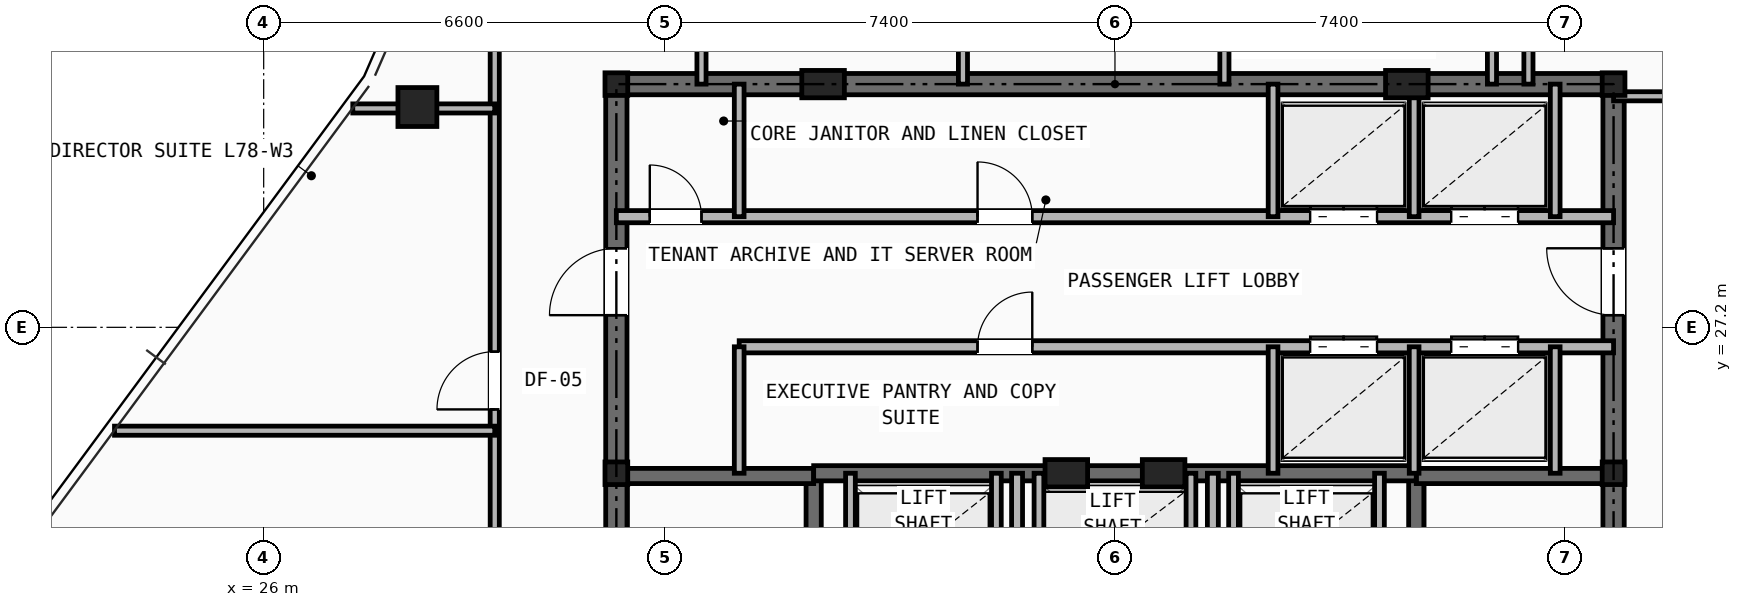
"""IFC4 building model, lengths in metres.
Left out: names, types, materials, properties, quantities, classifications, styles, units other than length and angle.
Written with IfcOpenShell. Run it as: python <this file> out.ifc"""

import sys

from ifc_helpers import new_model, si_unit, direction, frame, frame_2d, origin, origin_2d, place, context, subcontext, project, spatial, rectangle, hollow_rectangle, i_section, extrude, element, fill, save


model = new_model("IFC4")
c1 = context("Model", 3, precision=1e-05, world=origin(), true_north=direction((0.0, 1.0)))
c2 = subcontext(c1, "Body", "Model", "MODEL_VIEW")
j1 = project(units=[si_unit("LENGTHUNIT", "METRE"), si_unit("PLANEANGLEUNIT", "RADIAN")], contexts=[c1])
p1 = place(None, origin())
s1 = spatial("IfcSite", under=j1, at=p1, CompositionType="ELEMENT")
p2 = place(p1, origin())
s2 = spatial("IfcBuilding", under=s1, at=p2, CompositionType="ELEMENT")
p3 = place(p2, frame((0.0, 0.0, 276.0)))
s3 = spatial("IfcBuildingStorey", under=s2, at=p3, CompositionType="ELEMENT", Elevation=276.0)
for number, where, z_axis, x_axis in (
    (1, (31.8, 24.8, 0.0), (0.0, 0.0, 1.0), (1.0, 0.0, 0.0)),
    (2, (48.2, 24.8, 0.0), (0.0, 0.0, 1.0), (1.0, 0.0, 0.0)),
    (3, (31.8, 31.2, 0.0), (0.0, 0.0, 1.0), (1.0, 0.0, 0.0)),
    (4, (48.2, 31.2, 0.0), (0.0, 0.0, 1.0), (1.0, 0.0, 0.0)),
):
    element("IfcColumn", number, at=place(p3, frame(where, z_axis=z_axis, x_axis=x_axis)), inside=s3, PredefinedType="COLUMN", context=c2, shape_type="SweptSolid", body=[
        extrude(i_section(OverallWidth=0.374, OverallDepth=0.372, WebThickness=0.016, FlangeThickness=0.026, at=origin_2d()), origin(), (0.0, 0.0, 1.0), 3.5),
    ])
for number, where, z_axis, x_axis in (
    (5, (35.2, 31.2, 0.0), (0.0, 0.0, 1.0), (1.0, 0.0, 0.0)),
    (6, (44.8, 31.2, 0.0), (0.0, 0.0, 1.0), (1.0, 0.0, 0.0)),
    (7, (39.2, 24.8, 0.0), (0.0, 0.0, 1.0), (1.0, 0.0, 0.0)),
    (8, (40.8, 24.8, 0.0), (0.0, 0.0, 1.0), (1.0, 0.0, 0.0)),
):
    element("IfcColumn", number, at=place(p3, frame(where, z_axis=z_axis, x_axis=x_axis)), inside=s3, PredefinedType="PILASTER", context=c2, shape_type="SweptSolid", body=[
        extrude(rectangle(XDim=0.7, YDim=0.45, at=origin_2d()), origin(), (0.0, 0.0, 1.0), 3.5),
    ])
p4 = place(p3, frame((28.528, 30.823, 0.0), z_axis=(0.0, 0.0, 1.0), x_axis=(1.0, 0.0, 0.0)))
e9 = element("IfcColumn", 9, at=p4, inside=s3, PredefinedType="COLUMN", context=c2, shape_type="SweptSolid", body=[
    extrude(hollow_rectangle(XDim=0.64, YDim=0.64, WallThickness=0.045, at=origin_2d()), origin(), (0.0, 0.0, 1.0), 3.5),
])
p5 = place(p3, frame((31.8, 31.2, 0.0), z_axis=(0.0, 0.0, 1.0), x_axis=(1.0, 0.0, 0.0)))
e10 = element("IfcWall", 10, at=p5, inside=s3, PredefinedType="SHEAR", context=c2, shape_type="SweptSolid", body=[
    extrude(rectangle(XDim=16.4, YDim=0.35, at=frame_2d((8.2, 0.0))), origin(), (0.0, 0.0, 1.0), 3.25),
])
p6 = place(p3, frame((31.8, 16.4, 0.0), z_axis=(0.0, 0.0, 1.0), x_axis=(0.0, 1.0, 0.0)))
e11 = element("IfcWall", 11, at=p6, inside=s3, PredefinedType="SHEAR", context=c2, shape_type="SweptSolid", body=[
    extrude(rectangle(XDim=14.8, YDim=0.35, at=frame_2d((7.4, 0.0))), origin(), (0.0, 0.0, 1.0), 3.25),
])
p7 = place(p6, frame((11.0, 0.0, 0.0)))
e12 = element("IfcOpeningElement", 12, at=p7, cuts=e11, PredefinedType="OPENING", context=c2, shape_type="SweptSolid", body=[
    extrude(rectangle(XDim=1.1, YDim=2.15, at=frame_2d((0.55, 1.075))), frame((0.0, 0.185, 0.0), z_axis=(0.0, -1.0, 0.0), x_axis=(1.0, 0.0, 0.0)), (0.0, 0.0, 1.0), 0.37),
])
p8 = place(p3, frame((48.2, 16.4, 0.0), z_axis=(0.0, 0.0, 1.0), x_axis=(0.0, 1.0, 0.0)))
e13 = element("IfcWall", 13, at=p8, inside=s3, PredefinedType="SHEAR", context=c2, shape_type="SweptSolid", body=[
    extrude(rectangle(XDim=14.8, YDim=0.35, at=frame_2d((7.4, 0.0))), origin(), (0.0, 0.0, 1.0), 3.25),
])
p9 = place(p8, frame((11.0, 0.0, 0.0)))
e14 = element("IfcOpeningElement", 14, at=p9, cuts=e13, PredefinedType="OPENING", context=c2, shape_type="SweptSolid", body=[
    extrude(rectangle(XDim=1.1, YDim=2.15, at=frame_2d((0.55, 1.075))), frame((0.0, 0.185, 0.0), z_axis=(0.0, -1.0, 0.0), x_axis=(1.0, 0.0, 0.0)), (0.0, 0.0, 1.0), 0.37),
])
p10 = place(p3, frame((35.045, 16.4, 0.0), z_axis=(0.0, 0.0, 1.0), x_axis=(0.0, 1.0, 0.0)))
e15 = element("IfcWall", 15, at=p10, inside=s3, PredefinedType="SHEAR", context=c2, shape_type="SweptSolid", body=[
    extrude(rectangle(XDim=8.4, YDim=0.25, at=frame_2d((4.2, 0.0))), origin(), (0.0, 0.0, 1.0), 3.25),
])
p11 = place(p10, frame((0.45, 0.0, 0.0)))
e16 = element("IfcOpeningElement", 16, at=p11, cuts=e15, PredefinedType="OPENING", context=c2, shape_type="SweptSolid", body=[
    extrude(rectangle(XDim=0.95, YDim=2.1, at=frame_2d((0.475, 1.05))), frame((0.0, 0.135, 0.0), z_axis=(0.0, -1.0, 0.0), x_axis=(1.0, 0.0, 0.0)), (0.0, 0.0, 1.0), 0.27),
])
p12 = place(p3, frame((31.8, 24.755, 0.0), z_axis=(0.0, 0.0, 1.0), x_axis=(1.0, 0.0, 0.0)))
e17 = element("IfcWall", 17, at=p12, inside=s3, PredefinedType="SHEAR", context=c2, shape_type="SweptSolid", body=[
    extrude(rectangle(XDim=3.245, YDim=0.25, at=frame_2d((1.623, 0.0))), origin(), (0.0, 0.0, 1.0), 3.25),
])
p13 = place(p3, frame((44.955, 16.4, 0.0), z_axis=(0.0, 0.0, 1.0), x_axis=(0.0, 1.0, 0.0)))
e18 = element("IfcWall", 18, at=p13, inside=s3, PredefinedType="SHEAR", context=c2, shape_type="SweptSolid", body=[
    extrude(rectangle(XDim=8.4, YDim=0.25, at=frame_2d((4.2, 0.0))), origin(), (0.0, 0.0, 1.0), 3.25),
])
p14 = place(p13, frame((0.45, 0.0, 0.0)))
e19 = element("IfcOpeningElement", 19, at=p14, cuts=e18, PredefinedType="OPENING", context=c2, shape_type="SweptSolid", body=[
    extrude(rectangle(XDim=0.95, YDim=2.1, at=frame_2d((0.475, 1.05))), frame((0.0, 0.135, 0.0), z_axis=(0.0, -1.0, 0.0), x_axis=(1.0, 0.0, 0.0)), (0.0, 0.0, 1.0), 0.27),
])
p15 = place(p3, frame((44.955, 24.755, 0.0), z_axis=(0.0, 0.0, 1.0), x_axis=(1.0, 0.0, 0.0)))
e20 = element("IfcWall", 20, at=p15, inside=s3, PredefinedType="SHEAR", context=c2, shape_type="SweptSolid", body=[
    extrude(rectangle(XDim=3.245, YDim=0.25, at=frame_2d((1.623, 0.0))), origin(), (0.0, 0.0, 1.0), 3.25),
])
p16 = place(p3, frame((35.045, 24.8, 0.0), z_axis=(0.0, 0.0, 1.0), x_axis=(1.0, 0.0, 0.0)))
e21 = element("IfcWall", 21, at=p16, inside=s3, PredefinedType="SHEAR", context=c2, shape_type="SweptSolid", body=[
    extrude(rectangle(XDim=9.91, YDim=0.25, at=frame_2d((4.955, 0.0))), origin(), (0.0, 0.0, 1.0), 3.25),
])
p17 = place(p3, frame((38.39, 16.4, 0.0), z_axis=(0.0, 0.0, 1.0), x_axis=(0.0, 1.0, 0.0)))
e22 = element("IfcWall", 22, at=p17, inside=s3, PredefinedType="PARTITIONING", context=c2, shape_type="SweptSolid", body=[
    extrude(rectangle(XDim=8.4, YDim=0.18, at=frame_2d((4.2, 0.0))), origin(), (0.0, 0.0, 1.0), 2.705),
])
p18 = place(p17, frame((3.8, 0.0, 0.0)))
e23 = element("IfcOpeningElement", 23, at=p18, cuts=e22, PredefinedType="OPENING", context=c2, shape_type="SweptSolid", body=[
    extrude(rectangle(XDim=0.95, YDim=2.1, at=frame_2d((0.475, 1.05))), frame((0.0, 0.1, 0.0), z_axis=(0.0, -1.0, 0.0), x_axis=(1.0, 0.0, 0.0)), (0.0, 0.0, 1.0), 0.2),
])
p19 = place(p3, frame((41.61, 16.4, 0.0), z_axis=(0.0, 0.0, 1.0), x_axis=(0.0, 1.0, 0.0)))
e24 = element("IfcWall", 24, at=p19, inside=s3, PredefinedType="PARTITIONING", context=c2, shape_type="SweptSolid", body=[
    extrude(rectangle(XDim=8.4, YDim=0.18, at=frame_2d((4.2, 0.0))), origin(), (0.0, 0.0, 1.0), 2.705),
])
for number, where, z_axis, x_axis in (
    (25, (35.65, 22.48, 0.0), (0.0, 0.0, 1.0), (0.0, 1.0, 0.0)),
    (26, (38.05, 22.48, 0.0), (0.0, 0.0, 1.0), (0.0, 1.0, 0.0)),
    (27, (41.95, 22.48, 0.0), (0.0, 0.0, 1.0), (0.0, 1.0, 0.0)),
    (28, (44.35, 22.48, 0.0), (0.0, 0.0, 1.0), (0.0, 1.0, 0.0)),
    (29, (38.75, 22.48, 0.0), (0.0, 0.0, 1.0), (0.0, 1.0, 0.0)),
    (30, (41.25, 22.48, 0.0), (0.0, 0.0, 1.0), (0.0, 1.0, 0.0)),
):
    element("IfcWall", number, at=place(p3, frame(where, z_axis=z_axis, x_axis=x_axis)), inside=s3, PredefinedType="SOLIDWALL", context=c2, shape_type="SweptSolid", body=[
        extrude(rectangle(XDim=2.32, YDim=0.16, at=frame_2d((1.16, 0.0))), origin(), (0.0, 0.0, 1.0), 3.25),
    ])
p20 = place(p3, frame((31.8, 29.02, 0.0), z_axis=(0.0, 0.0, 1.0), x_axis=(1.0, 0.0, 0.0)))
e31 = element("IfcWall", 31, at=p20, inside=s3, PredefinedType="SOLIDWALL", context=c2, shape_type="SweptSolid", body=[
    extrude(rectangle(XDim=16.4, YDim=0.2, at=frame_2d((8.2, 0.0))), origin(), (0.0, 0.0, 1.0), 2.705),
])
p21 = place(p20, frame((0.55, 0.0, 0.0)))
e32 = element("IfcOpeningElement", 32, at=p21, cuts=e31, PredefinedType="OPENING", context=c2, shape_type="SweptSolid", body=[
    extrude(rectangle(XDim=0.85, YDim=2.05, at=frame_2d((0.425, 1.025))), frame((0.0, 0.11, 0.0), z_axis=(0.0, -1.0, 0.0), x_axis=(1.0, 0.0, 0.0)), (0.0, 0.0, 1.0), 0.22),
])
p22 = place(p20, frame((5.94, 0.0, 0.0)))
e33 = element("IfcOpeningElement", 33, at=p22, cuts=e31, PredefinedType="OPENING", context=c2, shape_type="SweptSolid", body=[
    extrude(rectangle(XDim=0.9, YDim=2.1, at=frame_2d((0.45, 1.05))), frame((0.0, 0.11, 0.0), z_axis=(0.0, -1.0, 0.0), x_axis=(1.0, 0.0, 0.0)), (0.0, 0.0, 1.0), 0.22),
])
p23 = place(p20, frame((11.41, 0.0, 0.0)))
e34 = element("IfcOpeningElement", 34, at=p23, cuts=e31, PredefinedType="OPENING", context=c2, shape_type="SweptSolid", body=[
    extrude(rectangle(XDim=1.1, YDim=2.15, at=frame_2d((0.55, 1.075))), frame((0.0, 0.11, 0.0), z_axis=(0.0, -1.0, 0.0), x_axis=(1.0, 0.0, 0.0)), (0.0, 0.0, 1.0), 0.22),
])
p24 = place(p20, frame((13.73, 0.0, 0.0)))
e35 = element("IfcOpeningElement", 35, at=p24, cuts=e31, PredefinedType="OPENING", context=c2, shape_type="SweptSolid", body=[
    extrude(rectangle(XDim=1.1, YDim=2.15, at=frame_2d((0.55, 1.075))), frame((0.0, 0.11, 0.0), z_axis=(0.0, -1.0, 0.0), x_axis=(1.0, 0.0, 0.0)), (0.0, 0.0, 1.0), 0.22),
])
p25 = place(p3, frame((33.82, 26.88, 0.0), z_axis=(0.0, 0.0, 1.0), x_axis=(1.0, 0.0, 0.0)))
e36 = element("IfcWall", 36, at=p25, inside=s3, PredefinedType="SOLIDWALL", context=c2, shape_type="SweptSolid", body=[
    extrude(rectangle(XDim=14.38, YDim=0.2, at=frame_2d((7.19, 0.0))), origin(), (0.0, 0.0, 1.0), 2.705),
])
p26 = place(p25, frame((3.92, 0.0, 0.0)))
e37 = element("IfcOpeningElement", 37, at=p26, cuts=e36, PredefinedType="OPENING", context=c2, shape_type="SweptSolid", body=[
    extrude(rectangle(XDim=0.9, YDim=2.1, at=frame_2d((0.45, 1.05))), frame((0.0, 0.11, 0.0), z_axis=(0.0, -1.0, 0.0), x_axis=(1.0, 0.0, 0.0)), (0.0, 0.0, 1.0), 0.22),
])
p27 = place(p25, frame((9.39, 0.0, 0.0)))
e38 = element("IfcOpeningElement", 38, at=p27, cuts=e36, PredefinedType="OPENING", context=c2, shape_type="SweptSolid", body=[
    extrude(rectangle(XDim=1.1, YDim=2.15, at=frame_2d((0.55, 1.075))), frame((0.0, 0.11, 0.0), z_axis=(0.0, -1.0, 0.0), x_axis=(1.0, 0.0, 0.0)), (0.0, 0.0, 1.0), 0.22),
])
p28 = place(p25, frame((11.71, 0.0, 0.0)))
e39 = element("IfcOpeningElement", 39, at=p28, cuts=e36, PredefinedType="OPENING", context=c2, shape_type="SweptSolid", body=[
    extrude(rectangle(XDim=1.1, YDim=2.15, at=frame_2d((0.55, 1.075))), frame((0.0, 0.11, 0.0), z_axis=(0.0, -1.0, 0.0), x_axis=(1.0, 0.0, 0.0)), (0.0, 0.0, 1.0), 0.22),
])
p29 = place(p3, frame((33.82, 29.02, 0.0), z_axis=(0.0, 0.0, 1.0), x_axis=(0.0, 1.0, 0.0)))
e40 = element("IfcWall", 40, at=p29, inside=s3, PredefinedType="SOLIDWALL", context=c2, shape_type="SweptSolid", body=[
    extrude(rectangle(XDim=2.18, YDim=0.16, at=frame_2d((1.09, 0.0))), origin(), (0.0, 0.0, 1.0), 2.705),
])
p30 = place(p3, frame((33.82, 24.8, 0.0), z_axis=(0.0, 0.0, 1.0), x_axis=(0.0, 1.0, 0.0)))
e41 = element("IfcWall", 41, at=p30, inside=s3, PredefinedType="SOLIDWALL", context=c2, shape_type="SweptSolid", body=[
    extrude(rectangle(XDim=2.08, YDim=0.16, at=frame_2d((1.04, 0.0))), origin(), (0.0, 0.0, 1.0), 3.25),
])
for number, where, z_axis, x_axis in (
    (42, (42.6, 29.02, 0.0), (0.0, 0.0, 1.0), (0.0, 1.0, 0.0)),
    (43, (44.92, 29.02, 0.0), (0.0, 0.0, 1.0), (0.0, 1.0, 0.0)),
    (44, (47.24, 29.02, 0.0), (0.0, 0.0, 1.0), (0.0, 1.0, 0.0)),
):
    element("IfcWall", number, at=place(p3, frame(where, z_axis=z_axis, x_axis=x_axis)), inside=s3, PredefinedType="SOLIDWALL", context=c2, shape_type="SweptSolid", body=[
        extrude(rectangle(XDim=2.18, YDim=0.16, at=frame_2d((1.09, 0.0))), origin(), (0.0, 0.0, 1.0), 2.705),
    ])
for number, where, z_axis, x_axis in (
    (45, (42.6, 24.8, 0.0), (0.0, 0.0, 1.0), (0.0, 1.0, 0.0)),
    (46, (44.92, 24.8, 0.0), (0.0, 0.0, 1.0), (0.0, 1.0, 0.0)),
    (47, (47.24, 24.8, 0.0), (0.0, 0.0, 1.0), (0.0, 1.0, 0.0)),
):
    element("IfcWall", number, at=place(p3, frame(where, z_axis=z_axis, x_axis=x_axis)), inside=s3, PredefinedType="SOLIDWALL", context=c2, shape_type="SweptSolid", body=[
        extrude(rectangle(XDim=2.08, YDim=0.16, at=frame_2d((1.04, 0.0))), origin(), (0.0, 0.0, 1.0), 3.25),
    ])
for number, where, z_axis, x_axis in (
    (48, (33.2, 31.2, 0.0), (0.0, 0.0, 1.0), (0.0, 1.0, 0.0)),
    (49, (46.2, 31.2, 0.0), (0.0, 0.0, 1.0), (0.0, 1.0, 0.0)),
    (50, (37.5, 31.2, 0.0), (0.0, 0.0, 1.0), (0.0, 1.0, 0.0)),
    (51, (41.8, 31.2, 0.0), (0.0, 0.0, 1.0), (0.0, 1.0, 0.0)),
):
    element("IfcWall", number, at=place(p3, frame(where, z_axis=z_axis, x_axis=x_axis)), inside=s3, PredefinedType="PARTITIONING", context=c2, shape_type="SweptSolid", body=[
        extrude(rectangle(XDim=2.6, YDim=0.15, at=frame_2d((1.3, 0.0))), origin(), (0.0, 0.0, 1.0), 2.705),
    ])
p31 = place(p3, frame((29.8, 16.4, 0.0), z_axis=(0.0, 0.0, 1.0), x_axis=(0.0, 1.0, 0.0)))
e52 = element("IfcWall", 52, at=p31, inside=s3, PredefinedType="PARTITIONING", context=c2, shape_type="SweptSolid", body=[
    extrude(rectangle(XDim=19.3, YDim=0.15, at=frame_2d((9.65, 0.0))), origin(), (0.0, 0.0, 1.0), 2.292),
])
p32 = place(p31, frame((0.35, 0.0, 0.0)))
e53 = element("IfcOpeningElement", 53, at=p32, cuts=e52, PredefinedType="OPENING", context=c2, shape_type="SweptSolid", body=[
    extrude(rectangle(XDim=0.95, YDim=2.1, at=frame_2d((0.475, 1.05))), frame((0.0, 0.085, 0.0), z_axis=(0.0, -1.0, 0.0), x_axis=(1.0, 0.0, 0.0)), (0.0, 0.0, 1.0), 0.17),
])
p33 = place(p31, frame((4.15, 0.0, 0.0)))
e54 = element("IfcOpeningElement", 54, at=p33, cuts=e52, PredefinedType="OPENING", context=c2, shape_type="SweptSolid", body=[
    extrude(rectangle(XDim=0.95, YDim=2.1, at=frame_2d((0.475, 1.05))), frame((0.0, 0.085, 0.0), z_axis=(0.0, -1.0, 0.0), x_axis=(1.0, 0.0, 0.0)), (0.0, 0.0, 1.0), 0.17),
])
p34 = place(p31, frame((9.45, 0.0, 0.0)))
e55 = element("IfcOpeningElement", 55, at=p34, cuts=e52, PredefinedType="OPENING", context=c2, shape_type="SweptSolid", body=[
    extrude(rectangle(XDim=0.95, YDim=2.1, at=frame_2d((0.475, 1.05))), frame((0.0, 0.085, 0.0), z_axis=(0.0, -1.0, 0.0), x_axis=(1.0, 0.0, 0.0)), (0.0, 0.0, 1.0), 0.17),
])
p35 = place(p3, frame((46.8, 31.2, 0.0), z_axis=(0.0, 0.0, 1.0), x_axis=(0.0, 1.0, 0.0)))
e56 = element("IfcWall", 56, at=p35, inside=s3, PredefinedType="PARTITIONING", context=c2, shape_type="SweptSolid", body=[
    extrude(rectangle(XDim=4.5, YDim=0.15, at=frame_2d((2.25, 0.0))), origin(), (0.0, 0.0, 1.0), 2.705),
])
p36 = place(p3, frame((23.547, 25.5, 0.0), z_axis=(0.0, 0.0, 1.0), x_axis=(1.0, 0.0, 0.0)))
e57 = element("IfcWall", 57, at=p36, inside=s3, PredefinedType="PARTITIONING", context=c2, shape_type="SweptSolid", body=[
    extrude(rectangle(XDim=6.253, YDim=0.15, at=frame_2d((3.127, 0.0))), origin(), (0.0, 0.0, 1.0), 2.628),
])
p37 = place(p3, frame((27.466, 30.8, 0.0), z_axis=(0.0, 0.0, 1.0), x_axis=(1.0, 0.0, 0.0)))
e58 = element("IfcWall", 58, at=p37, inside=s3, PredefinedType="PARTITIONING", context=c2, shape_type="SweptSolid", body=[
    extrude(rectangle(XDim=2.334, YDim=0.15, at=frame_2d((1.167, 0.0))), origin(), (0.0, 0.0, 1.0), 2.292),
])
p38 = place(p3, frame((48.2, 31.0, 0.0), z_axis=(0.0, 0.0, 1.0), x_axis=(1.0, 0.0, 0.0)))
e59 = element("IfcWall", 59, at=p38, inside=s3, PredefinedType="PARTITIONING", context=c2, shape_type="SweptSolid", body=[
    extrude(rectangle(XDim=4.187, YDim=0.15, at=frame_2d((2.093, 0.0))), origin(), (0.0, 0.0, 1.0), 2.292),
])
p39 = place(p38, frame((1.4, 0.0, 0.0)))
e60 = element("IfcOpeningElement", 60, at=p39, cuts=e59, PredefinedType="OPENING", context=c2, shape_type="SweptSolid", body=[
    extrude(rectangle(XDim=0.95, YDim=2.1, at=frame_2d((0.475, 1.05))), frame((0.0, 0.085, 0.0), z_axis=(0.0, -1.0, 0.0), x_axis=(1.0, 0.0, 0.0)), (0.0, 0.0, 1.0), 0.17),
])
p40 = place(p21, origin())
e61 = element("IfcDoor", 61, at=p40, inside=s3, OperationType="SINGLE_SWING_LEFT", PredefinedType="DOOR", context=c2, shape_type="SweptSolid", body=[
    extrude(rectangle(XDim=0.85, YDim=2.05, at=frame_2d((0.425, 1.025))), frame((0.0, 0.025, 0.0), z_axis=(0.0, -1.0, 0.0), x_axis=(1.0, 0.0, 0.0)), (0.0, 0.0, 1.0), 0.05),
])
fill(e32, e61)
p41 = place(p7, origin())
e62 = element("IfcDoor", 62, at=p41, inside=s3, OperationType="SINGLE_SWING_LEFT", PredefinedType="DOOR", context=c2, shape_type="SweptSolid", body=[
    extrude(rectangle(XDim=1.1, YDim=2.15, at=frame_2d((0.55, 1.075))), frame((0.0, 0.025, 0.0), z_axis=(0.0, -1.0, 0.0), x_axis=(1.0, 0.0, 0.0)), (0.0, 0.0, 1.0), 0.05),
])
fill(e12, e62)
p42 = place(p9, origin())
e63 = element("IfcDoor", 63, at=p42, inside=s3, OperationType="SINGLE_SWING_RIGHT", PredefinedType="DOOR", context=c2, shape_type="SweptSolid", body=[
    extrude(rectangle(XDim=1.1, YDim=2.15, at=frame_2d((0.55, 1.075))), frame((0.0, 0.025, 0.0), z_axis=(0.0, -1.0, 0.0), x_axis=(1.0, 0.0, 0.0)), (0.0, 0.0, 1.0), 0.05),
])
fill(e14, e63)
p43 = place(p22, origin())
e64 = element("IfcDoor", 64, at=p43, inside=s3, OperationType="SINGLE_SWING_LEFT", PredefinedType="DOOR", context=c2, shape_type="SweptSolid", body=[
    extrude(rectangle(XDim=0.9, YDim=2.1, at=frame_2d((0.45, 1.05))), frame((0.0, 0.025, 0.0), z_axis=(0.0, -1.0, 0.0), x_axis=(1.0, 0.0, 0.0)), (0.0, 0.0, 1.0), 0.05),
])
fill(e33, e64)
p44 = place(p26, origin())
e65 = element("IfcDoor", 65, at=p44, inside=s3, OperationType="SINGLE_SWING_RIGHT", PredefinedType="DOOR", context=c2, shape_type="SweptSolid", body=[
    extrude(rectangle(XDim=0.9, YDim=2.1, at=frame_2d((0.45, 1.05))), frame((0.0, 0.025, 0.0), z_axis=(0.0, -1.0, 0.0), x_axis=(1.0, 0.0, 0.0)), (0.0, 0.0, 1.0), 0.05),
])
fill(e37, e65)
p45 = place(p23, origin())
e66 = element("IfcDoor", 66, at=p45, inside=s3, OperationType="DOUBLE_DOOR_SLIDING", PredefinedType="DOOR", context=c2, shape_type="SweptSolid", body=[
    extrude(rectangle(XDim=1.1, YDim=2.15, at=frame_2d((0.55, 1.075))), frame((0.0, 0.025, 0.0), z_axis=(0.0, -1.0, 0.0), x_axis=(1.0, 0.0, 0.0)), (0.0, 0.0, 1.0), 0.05),
])
fill(e34, e66)
p46 = place(p24, origin())
e67 = element("IfcDoor", 67, at=p46, inside=s3, OperationType="DOUBLE_DOOR_SLIDING", PredefinedType="DOOR", context=c2, shape_type="SweptSolid", body=[
    extrude(rectangle(XDim=1.1, YDim=2.15, at=frame_2d((0.55, 1.075))), frame((0.0, 0.025, 0.0), z_axis=(0.0, -1.0, 0.0), x_axis=(1.0, 0.0, 0.0)), (0.0, 0.0, 1.0), 0.05),
])
fill(e35, e67)
p47 = place(p27, origin())
e68 = element("IfcDoor", 68, at=p47, inside=s3, OperationType="DOUBLE_DOOR_SLIDING", PredefinedType="DOOR", context=c2, shape_type="SweptSolid", body=[
    extrude(rectangle(XDim=1.1, YDim=2.15, at=frame_2d((0.55, 1.075))), frame((0.0, 0.025, 0.0), z_axis=(0.0, -1.0, 0.0), x_axis=(1.0, 0.0, 0.0)), (0.0, 0.0, 1.0), 0.05),
])
fill(e38, e68)
p48 = place(p28, origin())
e69 = element("IfcDoor", 69, at=p48, inside=s3, OperationType="DOUBLE_DOOR_SLIDING", PredefinedType="DOOR", context=c2, shape_type="SweptSolid", body=[
    extrude(rectangle(XDim=1.1, YDim=2.15, at=frame_2d((0.55, 1.075))), frame((0.0, 0.025, 0.0), z_axis=(0.0, -1.0, 0.0), x_axis=(1.0, 0.0, 0.0)), (0.0, 0.0, 1.0), 0.05),
])
fill(e39, e69)
p49 = place(p34, origin())
e70 = element("IfcDoor", 70, at=p49, inside=s3, OperationType="SINGLE_SWING_LEFT", PredefinedType="DOOR", context=c2, shape_type="SweptSolid", body=[
    extrude(rectangle(XDim=0.95, YDim=2.1, at=frame_2d((0.475, 1.05))), frame((0.0, 0.025, 0.0), z_axis=(0.0, -1.0, 0.0), x_axis=(1.0, 0.0, 0.0)), (0.0, 0.0, 1.0), 0.05),
])
fill(e55, e70)
save(model, sys.argv[1])
